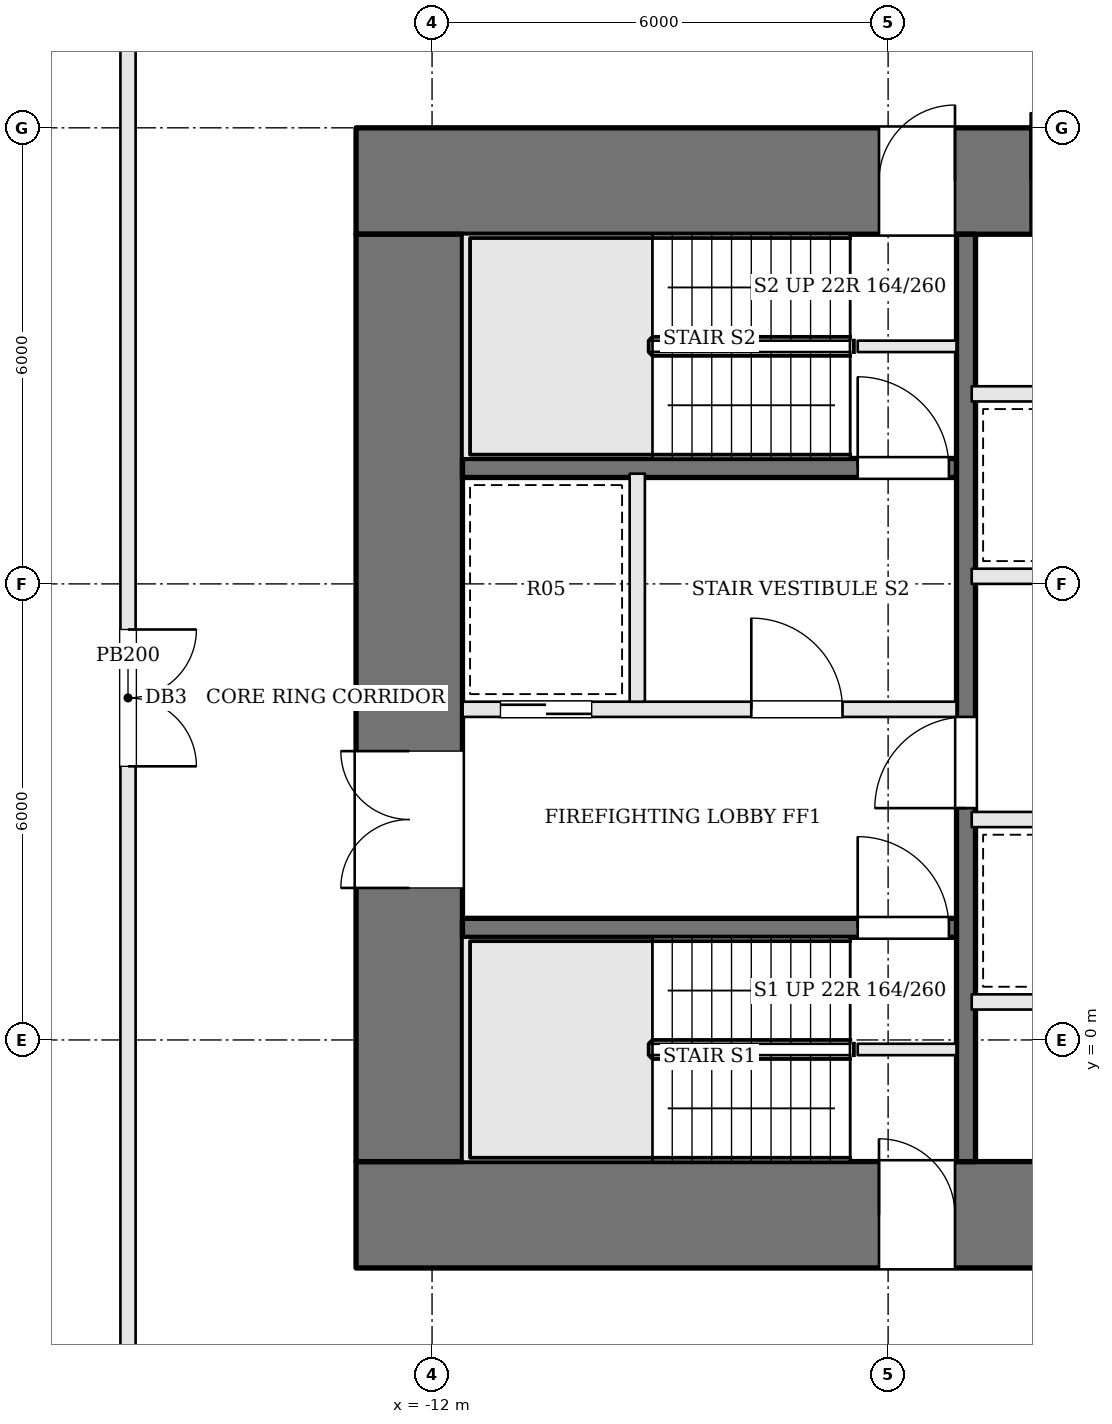
"""IFC4 building model, lengths in metres.
Left out: names, types, materials, properties, quantities, classifications, styles, units other than length and angle.
Written with IfcOpenShell. Run it as: python <this file> out.ifc"""

import sys

from ifc_helpers import new_model, si_unit, direction, frame, frame_2d, origin, place, context, subcontext, project, spatial, rectangle, extrude, element, fill, save


model = new_model("IFC4")
c1 = context("Model", 3, precision=1e-05, world=origin(), true_north=direction((0.0, 1.0)))
c2 = subcontext(c1, "Body", "Model", "MODEL_VIEW")
j1 = project(units=[si_unit("LENGTHUNIT", "METRE"), si_unit("PLANEANGLEUNIT", "RADIAN")], contexts=[c1])
p1 = place(None, origin())
s1 = spatial("IfcSite", under=j1, at=p1, CompositionType="ELEMENT")
p2 = place(p1, origin())
s2 = spatial("IfcBuilding", under=s1, at=p2, CompositionType="ELEMENT")
p3 = place(p2, frame((0.0, 0.0, 55.5)))
s3 = spatial("IfcBuildingStorey", under=s2, at=p3, CompositionType="ELEMENT", Elevation=55.5)
p4 = place(p3, frame((-13.0, 11.3, 0.0), z_axis=(0.0, 0.0, 1.0), x_axis=(1.0, 0.0, 0.0)))
e1 = element("IfcWall", 1, at=p4, inside=s3, PredefinedType="SHEAR", context=c2, shape_type="SweptSolid", body=[
    extrude(rectangle(XDim=26.0, YDim=1.4, at=frame_2d((13.0, 0.0))), origin(), (0.0, 0.0, 1.0), 3.6),
])
p5 = place(p4, frame((8.875, 0.0, 0.0)))
e2 = element("IfcOpeningElement", 2, at=p5, cuts=e1, PredefinedType="OPENING", context=c2, shape_type="SweptSolid", body=[
    extrude(rectangle(XDim=0.9, YDim=2.1, at=frame_2d((0.45, 1.05))), frame((0.0, 0.71, 0.0), z_axis=(0.0, -1.0, 0.0), x_axis=(1.0, 0.0, 0.0)), (0.0, 0.0, 1.0), 1.42),
])
p6 = place(p4, frame((11.425, 0.0, 0.0)))
e3 = element("IfcOpeningElement", 3, at=p6, cuts=e1, PredefinedType="OPENING", context=c2, shape_type="SweptSolid", body=[
    extrude(rectangle(XDim=0.7, YDim=2.1, at=frame_2d((0.35, 1.05))), frame((0.0, 0.71, 0.0), z_axis=(0.0, -1.0, 0.0), x_axis=(1.0, 0.0, 0.0)), (0.0, 0.0, 1.0), 1.42),
])
p7 = place(p4, frame((14.125, 0.0, 0.0)))
e4 = element("IfcOpeningElement", 4, at=p7, cuts=e1, PredefinedType="OPENING", context=c2, shape_type="SweptSolid", body=[
    extrude(rectangle(XDim=1.0, YDim=2.1, at=frame_2d((0.5, 1.05))), frame((0.0, 0.71, 0.0), z_axis=(0.0, -1.0, 0.0), x_axis=(1.0, 0.0, 0.0)), (0.0, 0.0, 1.0), 1.42),
])
p8 = place(p4, frame((16.725, 0.0, 0.0)))
e5 = element("IfcOpeningElement", 5, at=p8, cuts=e1, PredefinedType="OPENING", context=c2, shape_type="SweptSolid", body=[
    extrude(rectangle(XDim=0.7, YDim=2.1, at=frame_2d((0.35, 1.05))), frame((0.0, 0.71, 0.0), z_axis=(0.0, -1.0, 0.0), x_axis=(1.0, 0.0, 0.0)), (0.0, 0.0, 1.0), 1.42),
])
p9 = place(p4, frame((6.88, 0.0, 0.0)))
e6 = element("IfcOpeningElement", 6, at=p9, cuts=e1, PredefinedType="OPENING", context=c2, shape_type="SweptSolid", body=[
    extrude(rectangle(XDim=1.0, YDim=2.1, at=frame_2d((0.5, 1.05))), frame((0.0, 0.71, 0.0), z_axis=(0.0, -1.0, 0.0), x_axis=(1.0, 0.0, 0.0)), (0.0, 0.0, 1.0), 1.42),
])
p10 = place(p4, frame((18.12, 0.0, 0.0)))
e7 = element("IfcOpeningElement", 7, at=p10, cuts=e1, PredefinedType="OPENING", context=c2, shape_type="SweptSolid", body=[
    extrude(rectangle(XDim=1.0, YDim=2.1, at=frame_2d((0.5, 1.05))), frame((0.0, 0.71, 0.0), z_axis=(0.0, -1.0, 0.0), x_axis=(1.0, 0.0, 0.0)), (0.0, 0.0, 1.0), 1.42),
])
p11 = place(p3, frame((-13.0, -2.3, 0.0), z_axis=(0.0, 0.0, 1.0), x_axis=(1.0, 0.0, 0.0)))
e8 = element("IfcWall", 8, at=p11, inside=s3, PredefinedType="SHEAR", context=c2, shape_type="SweptSolid", body=[
    extrude(rectangle(XDim=26.0, YDim=1.4, at=frame_2d((13.0, 0.0))), origin(), (0.0, 0.0, 1.0), 3.6),
])
p12 = place(p11, frame((9.225, 0.0, 0.0)))
e9 = element("IfcOpeningElement", 9, at=p12, cuts=e8, PredefinedType="OPENING", context=c2, shape_type="SweptSolid", body=[
    extrude(rectangle(XDim=1.0, YDim=2.1, at=frame_2d((0.5, 1.05))), frame((0.0, 0.71, 0.0), z_axis=(0.0, -1.0, 0.0), x_axis=(1.0, 0.0, 0.0)), (0.0, 0.0, 1.0), 1.42),
])
p13 = place(p11, frame((11.825, 0.0, 0.0)))
e10 = element("IfcOpeningElement", 10, at=p13, cuts=e8, PredefinedType="OPENING", context=c2, shape_type="SweptSolid", body=[
    extrude(rectangle(XDim=0.7, YDim=2.1, at=frame_2d((0.35, 1.05))), frame((0.0, 0.71, 0.0), z_axis=(0.0, -1.0, 0.0), x_axis=(1.0, 0.0, 0.0)), (0.0, 0.0, 1.0), 1.42),
])
p14 = place(p11, frame((13.875, 0.0, 0.0)))
e11 = element("IfcOpeningElement", 11, at=p14, cuts=e8, PredefinedType="OPENING", context=c2, shape_type="SweptSolid", body=[
    extrude(rectangle(XDim=0.7, YDim=2.1, at=frame_2d((0.35, 1.05))), frame((0.0, 0.71, 0.0), z_axis=(0.0, -1.0, 0.0), x_axis=(1.0, 0.0, 0.0)), (0.0, 0.0, 1.0), 1.42),
])
p15 = place(p11, frame((16.225, 0.0, 0.0)))
e12 = element("IfcOpeningElement", 12, at=p15, cuts=e8, PredefinedType="OPENING", context=c2, shape_type="SweptSolid", body=[
    extrude(rectangle(XDim=0.9, YDim=2.1, at=frame_2d((0.45, 1.05))), frame((0.0, 0.71, 0.0), z_axis=(0.0, -1.0, 0.0), x_axis=(1.0, 0.0, 0.0)), (0.0, 0.0, 1.0), 1.42),
])
p16 = place(p11, frame((6.88, 0.0, 0.0)))
e13 = element("IfcOpeningElement", 13, at=p16, cuts=e8, PredefinedType="OPENING", context=c2, shape_type="SweptSolid", body=[
    extrude(rectangle(XDim=1.0, YDim=2.1, at=frame_2d((0.5, 1.05))), frame((0.0, 0.71, 0.0), z_axis=(0.0, -1.0, 0.0), x_axis=(1.0, 0.0, 0.0)), (0.0, 0.0, 1.0), 1.42),
])
p17 = place(p11, frame((18.12, 0.0, 0.0)))
e14 = element("IfcOpeningElement", 14, at=p17, cuts=e8, PredefinedType="OPENING", context=c2, shape_type="SweptSolid", body=[
    extrude(rectangle(XDim=1.0, YDim=2.1, at=frame_2d((0.5, 1.05))), frame((0.0, 0.71, 0.0), z_axis=(0.0, -1.0, 0.0), x_axis=(1.0, 0.0, 0.0)), (0.0, 0.0, 1.0), 1.42),
])
p18 = place(p3, frame((-12.3, -1.6, 0.0), z_axis=(0.0, 0.0, 1.0), x_axis=(0.0, 1.0, 0.0)))
e15 = element("IfcWall", 15, at=p18, inside=s3, PredefinedType="SHEAR", context=c2, shape_type="SweptSolid", body=[
    extrude(rectangle(XDim=12.2, YDim=1.4, at=frame_2d((6.1, 0.0))), origin(), (0.0, 0.0, 1.0), 3.6),
])
p19 = place(p18, frame((3.6, 0.0, 0.0)))
e16 = element("IfcOpeningElement", 16, at=p19, cuts=e15, PredefinedType="OPENING", context=c2, shape_type="SweptSolid", body=[
    extrude(rectangle(XDim=1.8, YDim=2.1, at=frame_2d((0.9, 1.05))), frame((0.0, 0.71, 0.0), z_axis=(0.0, -1.0, 0.0), x_axis=(1.0, 0.0, 0.0)), (0.0, 0.0, 1.0), 1.42),
])
for number, where, z_axis, x_axis in (
    (17, (-6.4, -0.125, 0.0), (0.0, 0.0, 1.0), (1.0, 0.0, 0.0)),
    (18, (-6.4, 9.125, 0.0), (0.0, 0.0, 1.0), (1.0, 0.0, 0.0)),
):
    element("IfcWall", number, at=place(p3, frame(where, z_axis=z_axis, x_axis=x_axis)), inside=s3, PredefinedType="SOLIDWALL", context=c2, shape_type="SweptSolid", body=[
        extrude(rectangle(XDim=1.3, YDim=0.15, at=frame_2d((0.65, 0.0))), origin(), (0.0, 0.0, 1.0), 3.4),
    ])
p20 = place(p3, frame((-11.6, 1.475, 0.0), z_axis=(0.0, 0.0, 1.0), x_axis=(1.0, 0.0, 0.0)))
e19 = element("IfcWall", 19, at=p20, inside=s3, PredefinedType="SOLIDWALL", context=c2, shape_type="SweptSolid", body=[
    extrude(rectangle(XDim=6.5, YDim=0.25, at=frame_2d((3.25, 0.0))), origin(), (0.0, 0.0, 1.0), 3.4),
])
p21 = place(p20, frame((5.2, 0.0, 0.0)))
e20 = element("IfcOpeningElement", 20, at=p21, cuts=e19, PredefinedType="OPENING", context=c2, shape_type="SweptSolid", body=[
    extrude(rectangle(XDim=1.2, YDim=2.1, at=frame_2d((0.6, 1.05))), frame((0.0, 0.135, 0.0), z_axis=(0.0, -1.0, 0.0), x_axis=(1.0, 0.0, 0.0)), (0.0, 0.0, 1.0), 0.27),
])
p22 = place(p3, frame((-11.6, 4.35, 0.0), z_axis=(0.0, 0.0, 1.0), x_axis=(1.0, 0.0, 0.0)))
e21 = element("IfcWall", 21, at=p22, inside=s3, PredefinedType="SOLIDWALL", context=c2, shape_type="SweptSolid", body=[
    extrude(rectangle(XDim=6.5, YDim=0.2, at=frame_2d((3.25, 0.0))), origin(), (0.0, 0.0, 1.0), 3.4),
])
p23 = place(p22, frame((3.8, 0.0, 0.0)))
e22 = element("IfcOpeningElement", 22, at=p23, cuts=e21, PredefinedType="OPENING", context=c2, shape_type="SweptSolid", body=[
    extrude(rectangle(XDim=1.2, YDim=2.1, at=frame_2d((0.6, 1.05))), frame((0.0, 0.11, 0.0), z_axis=(0.0, -1.0, 0.0), x_axis=(1.0, 0.0, 0.0)), (0.0, 0.0, 1.0), 0.22),
])
p24 = place(p22, frame((0.5, 0.0, 0.0)))
e23 = element("IfcOpeningElement", 23, at=p24, cuts=e21, PredefinedType="OPENING", context=c2, shape_type="SweptSolid", body=[
    extrude(rectangle(XDim=1.2, YDim=2.1, at=frame_2d((0.6, 1.05))), frame((0.0, 0.11, 0.0), z_axis=(0.0, -1.0, 0.0), x_axis=(1.0, 0.0, 0.0)), (0.0, 0.0, 1.0), 0.22),
])
p25 = place(p3, frame((-11.6, 7.525, 0.0), z_axis=(0.0, 0.0, 1.0), x_axis=(1.0, 0.0, 0.0)))
e24 = element("IfcWall", 24, at=p25, inside=s3, PredefinedType="SOLIDWALL", context=c2, shape_type="SweptSolid", body=[
    extrude(rectangle(XDim=6.5, YDim=0.25, at=frame_2d((3.25, 0.0))), origin(), (0.0, 0.0, 1.0), 3.4),
])
p26 = place(p25, frame((5.2, 0.0, 0.0)))
e25 = element("IfcOpeningElement", 25, at=p26, cuts=e24, PredefinedType="OPENING", context=c2, shape_type="SweptSolid", body=[
    extrude(rectangle(XDim=1.2, YDim=2.1, at=frame_2d((0.6, 1.05))), frame((0.0, 0.135, 0.0), z_axis=(0.0, -1.0, 0.0), x_axis=(1.0, 0.0, 0.0)), (0.0, 0.0, 1.0), 0.27),
])
p27 = place(p3, frame((-9.3, 4.45, 0.0), z_axis=(0.0, 0.0, 1.0), x_axis=(0.0, 1.0, 0.0)))
e26 = element("IfcWall", 26, at=p27, inside=s3, PredefinedType="SOLIDWALL", context=c2, shape_type="SweptSolid", body=[
    extrude(rectangle(XDim=3.0, YDim=0.2, at=frame_2d((1.5, 0.0))), origin(), (0.0, 0.0, 1.0), 3.4),
])
p28 = place(p3, frame((-4.975, -1.6, 0.0), z_axis=(0.0, 0.0, 1.0), x_axis=(0.0, 1.0, 0.0)))
e27 = element("IfcWall", 27, at=p28, inside=s3, PredefinedType="SOLIDWALL", context=c2, shape_type="SweptSolid", body=[
    extrude(rectangle(XDim=12.2, YDim=0.25, at=frame_2d((6.1, 0.0))), origin(), (0.0, 0.0, 1.0), 3.4),
])
p29 = place(p28, frame((4.65, 0.0, 0.0)))
e28 = element("IfcOpeningElement", 28, at=p29, cuts=e27, PredefinedType="OPENING", context=c2, shape_type="SweptSolid", body=[
    extrude(rectangle(XDim=1.2, YDim=2.1, at=frame_2d((0.6, 1.05))), frame((0.0, 0.135, 0.0), z_axis=(0.0, -1.0, 0.0), x_axis=(1.0, 0.0, 0.0)), (0.0, 0.0, 1.0), 0.27),
])
for number, where, z_axis, x_axis in (
    (29, (-4.9, 0.5, 0.0), (0.0, 0.0, 1.0), (1.0, 0.0, 0.0)),
    (30, (-4.9, 2.9, 0.0), (0.0, 0.0, 1.0), (1.0, 0.0, 0.0)),
    (31, (-4.9, 6.1, 0.0), (0.0, 0.0, 1.0), (1.0, 0.0, 0.0)),
    (32, (-4.9, 8.5, 0.0), (0.0, 0.0, 1.0), (1.0, 0.0, 0.0)),
):
    element("IfcWall", number, at=place(p3, frame(where, z_axis=z_axis, x_axis=x_axis)), inside=s3, PredefinedType="SOLIDWALL", context=c2, shape_type="SweptSolid", body=[
        extrude(rectangle(XDim=9.8, YDim=0.2, at=frame_2d((4.9, 0.0))), origin(), (0.0, 0.0, 1.0), 3.4),
    ])
p30 = place(p3, frame((-19.962, 12.664, 0.0), z_axis=(0.0, 0.0, 1.0), x_axis=(0.847109868331, 0.531417793243, 0.0)))
e33 = element("IfcWall", 33, at=p30, inside=s3, PredefinedType="PARTITIONING", context=c2, shape_type="SweptSolid", body=[
    extrude(rectangle(XDim=5.812, YDim=0.2, at=frame_2d((2.906, 0.0))), origin(), (0.0, 0.0, 1.0), 3.4),
])
p31 = place(p3, frame((-16.0, 14.9, 0.0), z_axis=(0.0, 0.0, 1.0), x_axis=(0.0, -1.0, 0.0)))
e34 = element("IfcWall", 34, at=p31, inside=s3, PredefinedType="PARTITIONING", context=c2, shape_type="SweptSolid", body=[
    extrude(rectangle(XDim=20.8, YDim=0.2, at=frame_2d((10.4, 0.0))), origin(), (0.0, 0.0, 1.0), 3.4),
])
p32 = place(p31, frame((9.5, 0.0, 0.0)))
e35 = element("IfcOpeningElement", 35, at=p32, cuts=e34, PredefinedType="OPENING", context=c2, shape_type="SweptSolid", body=[
    extrude(rectangle(XDim=1.8, YDim=2.1, at=frame_2d((0.9, 1.05))), frame((0.0, 0.11, 0.0), z_axis=(0.0, -1.0, 0.0), x_axis=(1.0, 0.0, 0.0)), (0.0, 0.0, 1.0), 0.22),
])
p33 = place(p19, origin())
e36 = element("IfcDoor", 36, at=p33, inside=s3, OperationType="DOUBLE_DOOR_SINGLE_SWING", PredefinedType="DOOR", context=c2, shape_type="SweptSolid", body=[
    extrude(rectangle(XDim=1.8, YDim=2.1, at=frame_2d((0.9, 1.05))), frame((0.0, 0.025, 0.0), z_axis=(0.0, -1.0, 0.0), x_axis=(1.0, 0.0, 0.0)), (0.0, 0.0, 1.0), 0.05),
])
fill(e16, e36)
p34 = place(p29, origin())
e37 = element("IfcDoor", 37, at=p34, inside=s3, OperationType="SINGLE_SWING_LEFT", PredefinedType="DOOR", context=c2, shape_type="SweptSolid", body=[
    extrude(rectangle(XDim=1.2, YDim=2.1, at=frame_2d((0.6, 1.05))), frame((0.0, 0.025, 0.0), z_axis=(0.0, -1.0, 0.0), x_axis=(1.0, 0.0, 0.0)), (0.0, 0.0, 1.0), 0.05),
])
fill(e28, e37)
p35 = place(p23, origin())
e38 = element("IfcDoor", 38, at=p35, inside=s3, OperationType="SINGLE_SWING_LEFT", PredefinedType="DOOR", context=c2, shape_type="SweptSolid", body=[
    extrude(rectangle(XDim=1.2, YDim=2.1, at=frame_2d((0.6, 1.05))), frame((0.0, 0.025, 0.0), z_axis=(0.0, -1.0, 0.0), x_axis=(1.0, 0.0, 0.0)), (0.0, 0.0, 1.0), 0.05),
])
fill(e22, e38)
p36 = place(p21, origin())
e39 = element("IfcDoor", 39, at=p36, inside=s3, OperationType="SINGLE_SWING_LEFT", PredefinedType="DOOR", context=c2, shape_type="SweptSolid", body=[
    extrude(rectangle(XDim=1.2, YDim=2.1, at=frame_2d((0.6, 1.05))), frame((0.0, 0.025, 0.0), z_axis=(0.0, -1.0, 0.0), x_axis=(1.0, 0.0, 0.0)), (0.0, 0.0, 1.0), 0.05),
])
fill(e20, e39)
p37 = place(p26, origin())
e40 = element("IfcDoor", 40, at=p37, inside=s3, OperationType="SINGLE_SWING_LEFT", PredefinedType="DOOR", context=c2, shape_type="SweptSolid", body=[
    extrude(rectangle(XDim=1.2, YDim=2.1, at=frame_2d((0.6, 1.05))), frame((0.0, 0.025, 0.0), z_axis=(0.0, -1.0, 0.0), x_axis=(1.0, 0.0, 0.0)), (0.0, 0.0, 1.0), 0.05),
])
fill(e25, e40)
p38 = place(p24, origin())
e41 = element("IfcDoor", 41, at=p38, inside=s3, OperationType="SLIDING_TO_RIGHT", PredefinedType="DOOR", context=c2, shape_type="SweptSolid", body=[
    extrude(rectangle(XDim=1.2, YDim=2.1, at=frame_2d((0.6, 1.05))), frame((0.0, 0.025, 0.0), z_axis=(0.0, -1.0, 0.0), x_axis=(1.0, 0.0, 0.0)), (0.0, 0.0, 1.0), 0.05),
])
fill(e23, e41)
p39 = place(p5, origin())
e42 = element("IfcDoor", 42, at=p39, inside=s3, OperationType="SINGLE_SWING_LEFT", PredefinedType="DOOR", context=c2, shape_type="SweptSolid", body=[
    extrude(rectangle(XDim=0.9, YDim=2.1, at=frame_2d((0.45, 1.05))), frame((0.0, 0.025, 0.0), z_axis=(0.0, -1.0, 0.0), x_axis=(1.0, 0.0, 0.0)), (0.0, 0.0, 1.0), 0.05),
])
fill(e2, e42)
p40 = place(p16, origin())
e43 = element("IfcDoor", 43, at=p40, inside=s3, OperationType="SINGLE_SWING_LEFT", PredefinedType="DOOR", context=c2, shape_type="SweptSolid", body=[
    extrude(rectangle(XDim=1.0, YDim=2.1, at=frame_2d((0.5, 1.05))), frame((0.0, 0.025, 0.0), z_axis=(0.0, -1.0, 0.0), x_axis=(1.0, 0.0, 0.0)), (0.0, 0.0, 1.0), 0.05),
])
fill(e13, e43)
p41 = place(p9, origin())
e44 = element("IfcDoor", 44, at=p41, inside=s3, OperationType="SINGLE_SWING_RIGHT", PredefinedType="DOOR", context=c2, shape_type="SweptSolid", body=[
    extrude(rectangle(XDim=1.0, YDim=2.1, at=frame_2d((0.5, 1.05))), frame((0.0, 0.025, 0.0), z_axis=(0.0, -1.0, 0.0), x_axis=(1.0, 0.0, 0.0)), (0.0, 0.0, 1.0), 0.05),
])
fill(e6, e44)
p42 = place(p32, origin())
e45 = element("IfcDoor", 45, at=p42, inside=s3, OperationType="DOUBLE_DOOR_SINGLE_SWING", PredefinedType="DOOR", context=c2, shape_type="SweptSolid", body=[
    extrude(rectangle(XDim=1.8, YDim=2.1, at=frame_2d((0.9, 1.05))), frame((0.0, 0.025, 0.0), z_axis=(0.0, -1.0, 0.0), x_axis=(1.0, 0.0, 0.0)), (0.0, 0.0, 1.0), 0.05),
])
fill(e35, e45)
save(model, sys.argv[1])
